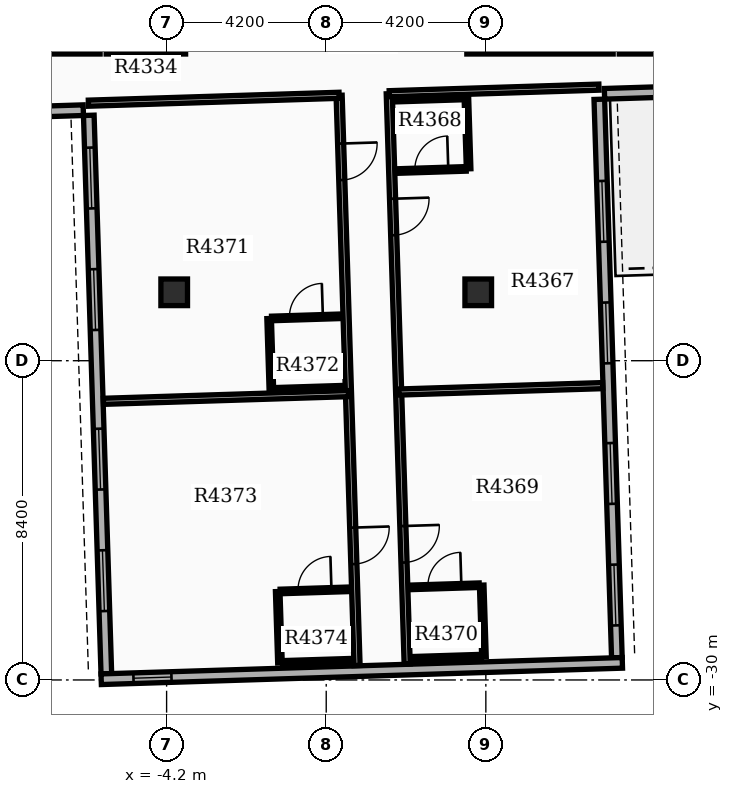
"""IFC4 building model, lengths in metres.
Left out: names, types, materials, properties, quantities, classifications, styles, units other than length and angle.
Written with IfcOpenShell. Run it as: python <this file> out.ifc"""

import sys

from ifc_helpers import new_model, si_unit, direction, frame, frame_2d, origin, origin_2d, place, context, subcontext, project, spatial, rectangle, extrude, element, fill, save


model = new_model("IFC4")
c1 = context("Model", 3, precision=1e-05, world=origin(), true_north=direction((0.0, 1.0)))
c2 = subcontext(c1, "Body", "Model", "MODEL_VIEW")
j1 = project(units=[si_unit("LENGTHUNIT", "METRE"), si_unit("PLANEANGLEUNIT", "RADIAN")], contexts=[c1])
p1 = place(None, origin())
s1 = spatial("IfcSite", under=j1, at=p1, CompositionType="ELEMENT")
p2 = place(p1, origin())
s2 = spatial("IfcBuilding", under=s1, at=p2, CompositionType="ELEMENT")
p3 = place(p2, frame((0.0, 0.0, 273.3)))
s3 = spatial("IfcBuildingStorey", under=s2, at=p3, CompositionType="ELEMENT", Elevation=273.3)
for number, where, z_axis, x_axis in (
    (1, (-4.0, -19.8, 0.0), (0.0, 0.0, 1.0), (1.0, 0.0, 0.0)),
    (2, (4.0, -19.8, 0.0), (0.0, 0.0, 1.0), (1.0, 0.0, 0.0)),
):
    element("IfcColumn", number, at=place(p3, frame(where, z_axis=z_axis, x_axis=x_axis)), inside=s3, PredefinedType="COLUMN", context=c2, shape_type="SweptSolid", body=[
        extrude(rectangle(XDim=0.7, YDim=0.7, at=origin_2d()), origin(), (0.0, 0.0, 1.0), 3.9),
    ])
p4 = place(p3, frame((-6.247, -15.144, 0.0), z_axis=(0.0, 0.0, 1.0), x_axis=(0.031406376864, -0.999506698073, 0.0)))
e3 = element("IfcWall", 3, at=p4, inside=s3, PredefinedType="STANDARD", context=c2, shape_type="SweptSolid", body=[
    extrude(rectangle(XDim=14.7, YDim=0.28, at=frame_2d((7.35, 0.0))), origin(), (0.0, 0.0, 1.0), 3.18),
])
p5 = place(p4, frame((0.85, 0.0, 0.8)))
e4 = element("IfcOpeningElement", 4, at=p5, cuts=e3, PredefinedType="OPENING", context=c2, shape_type="SweptSolid", body=[
    extrude(rectangle(XDim=1.6, YDim=1.7, at=frame_2d((0.8, 0.85))), frame((0.0, 0.15, 0.0), z_axis=(0.0, -1.0, 0.0), x_axis=(1.0, 0.0, 0.0)), (0.0, 0.0, 1.0), 0.3),
])
p6 = place(p4, frame((4.05, 0.0, 0.8)))
e5 = element("IfcOpeningElement", 5, at=p6, cuts=e3, PredefinedType="OPENING", context=c2, shape_type="SweptSolid", body=[
    extrude(rectangle(XDim=1.6, YDim=1.7, at=frame_2d((0.8, 0.85))), frame((0.0, 0.15, 0.0), z_axis=(0.0, -1.0, 0.0), x_axis=(1.0, 0.0, 0.0)), (0.0, 0.0, 1.0), 0.3),
])
p7 = place(p4, frame((8.25, 0.0, 0.8)))
e6 = element("IfcOpeningElement", 6, at=p7, cuts=e3, PredefinedType="OPENING", context=c2, shape_type="SweptSolid", body=[
    extrude(rectangle(XDim=1.6, YDim=1.7, at=frame_2d((0.8, 0.85))), frame((0.0, 0.15, 0.0), z_axis=(0.0, -1.0, 0.0), x_axis=(1.0, 0.0, 0.0)), (0.0, 0.0, 1.0), 0.3),
])
p8 = place(p4, frame((11.45, 0.0, 0.8)))
e7 = element("IfcOpeningElement", 7, at=p8, cuts=e3, PredefinedType="OPENING", context=c2, shape_type="SweptSolid", body=[
    extrude(rectangle(XDim=1.6, YDim=1.7, at=frame_2d((0.8, 0.85))), frame((0.0, 0.15, 0.0), z_axis=(0.0, -1.0, 0.0), x_axis=(1.0, 0.0, 0.0)), (0.0, 0.0, 1.0), 0.3),
])
p9 = place(p3, frame((7.648, -29.414, 0.0), z_axis=(0.0, 0.0, 1.0), x_axis=(-0.031405855522, 0.999506714454, 0.0)))
e8 = element("IfcWall", 8, at=p9, inside=s3, PredefinedType="STANDARD", context=c2, shape_type="SweptSolid", body=[
    extrude(rectangle(XDim=14.7, YDim=0.28, at=frame_2d((7.35, 0.0))), origin(), (0.0, 0.0, 1.0), 3.18),
])
p10 = place(p9, frame((0.85, 0.0, 0.8)))
e9 = element("IfcOpeningElement", 9, at=p10, cuts=e8, PredefinedType="OPENING", context=c2, shape_type="SweptSolid", body=[
    extrude(rectangle(XDim=1.6, YDim=1.7, at=frame_2d((0.8, 0.85))), frame((0.0, 0.15, 0.0), z_axis=(0.0, -1.0, 0.0), x_axis=(1.0, 0.0, 0.0)), (0.0, 0.0, 1.0), 0.3),
])
p11 = place(p9, frame((4.05, 0.0, 0.8)))
e10 = element("IfcOpeningElement", 10, at=p11, cuts=e8, PredefinedType="OPENING", context=c2, shape_type="SweptSolid", body=[
    extrude(rectangle(XDim=1.6, YDim=1.7, at=frame_2d((0.8, 0.85))), frame((0.0, 0.15, 0.0), z_axis=(0.0, -1.0, 0.0), x_axis=(1.0, 0.0, 0.0)), (0.0, 0.0, 1.0), 0.3),
])
p12 = place(p9, frame((7.75, 0.0, 0.8)))
e11 = element("IfcOpeningElement", 11, at=p12, cuts=e8, PredefinedType="OPENING", context=c2, shape_type="SweptSolid", body=[
    extrude(rectangle(XDim=1.6, YDim=1.7, at=frame_2d((0.8, 0.85))), frame((0.0, 0.15, 0.0), z_axis=(0.0, -1.0, 0.0), x_axis=(1.0, 0.0, 0.0)), (0.0, 0.0, 1.0), 0.3),
])
p13 = place(p9, frame((10.95, 0.0, 0.8)))
e12 = element("IfcOpeningElement", 12, at=p13, cuts=e8, PredefinedType="OPENING", context=c2, shape_type="SweptSolid", body=[
    extrude(rectangle(XDim=1.6, YDim=1.7, at=frame_2d((0.8, 0.85))), frame((0.0, 0.15, 0.0), z_axis=(0.0, -1.0, 0.0), x_axis=(1.0, 0.0, 0.0)), (0.0, 0.0, 1.0), 0.3),
])
p14 = place(p3, frame((-5.921, -29.981, 0.0), z_axis=(0.0, 0.0, 1.0), x_axis=(0.999506662003, 0.031407524763, 0.0)))
e13 = element("IfcWall", 13, at=p14, inside=s3, PredefinedType="STANDARD", context=c2, shape_type="SweptSolid", body=[
    extrude(rectangle(XDim=13.72, YDim=0.28, at=frame_2d((6.86, 0.0))), origin(), (0.0, 0.0, 1.0), 3.18),
])
p15 = place(p14, frame((0.85, 0.0, 0.85)))
e14 = element("IfcOpeningElement", 14, at=p15, cuts=e13, PredefinedType="OPENING", context=c2, shape_type="SweptSolid", body=[
    extrude(rectangle(XDim=1.0, YDim=1.5, at=frame_2d((0.5, 0.75))), frame((0.0, 0.15, 0.0), z_axis=(0.0, -1.0, 0.0), x_axis=(1.0, 0.0, 0.0)), (0.0, 0.0, 1.0), 0.3),
])
p16 = place(p3, frame((-12.689, -15.206, 0.0), z_axis=(0.0, 0.0, 1.0), x_axis=(0.999507262922, 0.031388395416, 0.0)))
e15 = element("IfcWall", 15, at=p16, inside=s3, PredefinedType="STANDARD", context=c2, shape_type="SweptSolid", body=[
    extrude(rectangle(XDim=6.3, YDim=0.28, at=frame_2d((3.15, 0.0))), origin(), (0.0, 0.0, 1.0), 3.18),
])
p17 = place(p3, frame((13.618, -14.379, 0.0), z_axis=(0.0, 0.0, 1.0), x_axis=(-0.999507224741, -0.031389611199, 0.0)))
e16 = element("IfcWall", 16, at=p17, inside=s3, PredefinedType="STANDARD", context=c2, shape_type="SweptSolid", body=[
    extrude(rectangle(XDim=6.3, YDim=0.28, at=frame_2d((3.15, 0.0))), origin(), (0.0, 0.0, 1.0), 3.18),
])
p18 = place(p3, frame((3.7, -13.45, 0.0), z_axis=(0.0, 0.0, 1.0), x_axis=(1.0, 0.0, 0.0)))
e17 = element("IfcWall", 17, at=p18, inside=s3, PredefinedType="PARTITIONING", context=c2, shape_type="SweptSolid", body=[
    extrude(rectangle(XDim=3.85, YDim=0.16, at=frame_2d((1.925, 0.0))), origin(), (0.0, 0.0, 1.0), 3.17),
])
p19 = place(p3, frame((7.71, -13.45, 0.0), z_axis=(0.0, 0.0, 1.0), x_axis=(1.0, 0.0, 0.0)))
e18 = element("IfcWall", 18, at=p19, inside=s3, PredefinedType="PARTITIONING", context=c2, shape_type="SweptSolid", body=[
    extrude(rectangle(XDim=3.29, YDim=0.16, at=frame_2d((1.645, 0.0))), origin(), (0.0, 0.0, 1.0), 3.17),
])
p20 = place(p3, frame((-7.89, -13.45, 0.0), z_axis=(0.0, 0.0, 1.0), x_axis=(1.0, 0.0, 0.0)))
e19 = element("IfcWall", 19, at=p20, inside=s3, PredefinedType="PARTITIONING", context=c2, shape_type="SweptSolid", body=[
    extrude(rectangle(XDim=1.94, YDim=0.16, at=frame_2d((0.97, 0.0))), origin(), (0.0, 0.0, 1.0), 3.17),
])
p21 = place(p3, frame((-5.79, -13.45, 0.0), z_axis=(0.0, 0.0, 1.0), x_axis=(1.0, 0.0, 0.0)))
e20 = element("IfcWall", 20, at=p21, inside=s3, PredefinedType="PARTITIONING", context=c2, shape_type="SweptSolid", body=[
    extrude(rectangle(XDim=2.09, YDim=0.16, at=frame_2d((1.045, 0.0))), origin(), (0.0, 0.0, 1.0), 3.17),
])
p22 = place(p3, frame((1.659, -14.575, 0.0), z_axis=(0.0, 0.0, 1.0), x_axis=(0.031404333983, -0.999506762262, 0.0)))
e21 = element("IfcWall", 21, at=p22, inside=s3, PredefinedType="PARTITIONING", context=c2, shape_type="SweptSolid", body=[
    extrude(rectangle(XDim=15.012, YDim=0.16, at=frame_2d((7.506, 0.0))), origin(), (0.0, 0.0, 1.0), 3.17),
])
p23 = place(p22, frame((2.765, 0.0, 0.0)))
e22 = element("IfcOpeningElement", 22, at=p23, cuts=e21, PredefinedType="OPENING", context=c2, shape_type="SweptSolid", body=[
    extrude(rectangle(XDim=0.96, YDim=2.15, at=frame_2d((0.48, 1.075))), frame((0.0, 0.09, 0.0), z_axis=(0.0, -1.0, 0.0), x_axis=(1.0, 0.0, 0.0)), (0.0, 0.0, 1.0), 0.18),
])
p24 = place(p22, frame((11.381, 0.0, 0.0)))
e23 = element("IfcOpeningElement", 23, at=p24, cuts=e21, PredefinedType="OPENING", context=c2, shape_type="SweptSolid", body=[
    extrude(rectangle(XDim=0.96, YDim=2.15, at=frame_2d((0.48, 1.075))), frame((0.0, 0.09, 0.0), z_axis=(0.0, -1.0, 0.0), x_axis=(1.0, 0.0, 0.0)), (0.0, 0.0, 1.0), 0.18),
])
p25 = place(p3, frame((1.659, -14.575, 0.0), z_axis=(0.0, 0.0, 1.0), x_axis=(0.999505408206, 0.031447400002, 0.0)))
e24 = element("IfcWall", 24, at=p25, inside=s3, PredefinedType="PARTITIONING", context=c2, shape_type="SweptSolid", body=[
    extrude(rectangle(XDim=5.52, YDim=0.16, at=frame_2d((2.76, 0.0))), origin(), (0.0, 0.0, 1.0), 3.17),
])
p26 = place(p3, frame((1.905, -22.424, 0.0), z_axis=(0.0, 0.0, 1.0), x_axis=(0.999505358078, 0.031448993216, 0.0)))
e25 = element("IfcWall", 25, at=p26, inside=s3, PredefinedType="PARTITIONING", context=c2, shape_type="SweptSolid", body=[
    extrude(rectangle(XDim=5.372, YDim=0.16, at=frame_2d((2.686, 0.0))), origin(), (0.0, 0.0, 1.0), 3.17),
])
p27 = place(p3, frame((1.863, -16.61, 0.0), z_axis=(0.0, 0.0, 1.0), x_axis=(0.999507221803, 0.031389704724, 0.0)))
e26 = element("IfcWall", 26, at=p27, inside=s3, PredefinedType="PARTITIONING", context=c2, shape_type="SweptSolid", body=[
    extrude(rectangle(XDim=1.82, YDim=0.12, at=frame_2d((0.91, 0.0))), origin(), (0.0, 0.0, 1.0), 3.17),
])
p28 = place(p27, frame((0.47, 0.0, 0.0)))
e27 = element("IfcOpeningElement", 27, at=p28, cuts=e26, PredefinedType="OPENING", context=c2, shape_type="SweptSolid", body=[
    extrude(rectangle(XDim=0.88, YDim=2.1, at=frame_2d((0.44, 1.05))), frame((0.0, 0.07, 0.0), z_axis=(0.0, -1.0, 0.0), x_axis=(1.0, 0.0, 0.0)), (0.0, 0.0, 1.0), 0.14),
])
p29 = place(p3, frame((1.804, -14.731, 0.0), z_axis=(0.0, 0.0, 1.0), x_axis=(0.999503004171, 0.03152371574, 0.0)))
e28 = element("IfcWall", 28, at=p29, inside=s3, PredefinedType="PARTITIONING", context=c2, shape_type="SweptSolid", body=[
    extrude(rectangle(XDim=1.82, YDim=0.12, at=frame_2d((0.91, 0.0))), origin(), (0.0, 0.0, 1.0), 3.17),
])
p30 = place(p3, frame((3.688, -14.671, 0.0), z_axis=(0.0, 0.0, 1.0), x_axis=(0.031295563454, -0.999510173889, 0.0)))
e29 = element("IfcWall", 29, at=p30, inside=s3, PredefinedType="PARTITIONING", context=c2, shape_type="SweptSolid", body=[
    extrude(rectangle(XDim=1.88, YDim=0.12, at=frame_2d((0.94, 0.0))), origin(), (0.0, 0.0, 1.0), 3.17),
])
p31 = place(p3, frame((2.207, -27.564, 0.0), z_axis=(0.0, 0.0, 1.0), x_axis=(0.999507221803, 0.031389704724, 0.0)))
e30 = element("IfcWall", 30, at=p31, inside=s3, PredefinedType="PARTITIONING", context=c2, shape_type="SweptSolid", body=[
    extrude(rectangle(XDim=1.82, YDim=0.12, at=frame_2d((0.91, 0.0))), origin(), (0.0, 0.0, 1.0), 3.17),
])
p32 = place(p31, frame((0.47, 0.0, 0.0)))
e31 = element("IfcOpeningElement", 31, at=p32, cuts=e30, PredefinedType="OPENING", context=c2, shape_type="SweptSolid", body=[
    extrude(rectangle(XDim=0.88, YDim=2.1, at=frame_2d((0.44, 1.05))), frame((0.0, 0.07, 0.0), z_axis=(0.0, -1.0, 0.0), x_axis=(1.0, 0.0, 0.0)), (0.0, 0.0, 1.0), 0.14),
])
p33 = place(p3, frame((2.266, -29.443, 0.0), z_axis=(0.0, 0.0, 1.0), x_axis=(0.999507221803, 0.031389704724, 0.0)))
e32 = element("IfcWall", 32, at=p33, inside=s3, PredefinedType="PARTITIONING", context=c2, shape_type="SweptSolid", body=[
    extrude(rectangle(XDim=1.82, YDim=0.12, at=frame_2d((0.91, 0.0))), origin(), (0.0, 0.0, 1.0), 3.17),
])
p34 = place(p3, frame((4.091, -27.505, 0.0), z_axis=(0.0, 0.0, 1.0), x_axis=(0.031299625942, -0.999510046681, 0.0)))
e33 = element("IfcWall", 33, at=p34, inside=s3, PredefinedType="PARTITIONING", context=c2, shape_type="SweptSolid", body=[
    extrude(rectangle(XDim=1.88, YDim=0.12, at=frame_2d((0.94, 0.0))), origin(), (0.0, 0.0, 1.0), 3.17),
])
p35 = place(p3, frame((0.339, -14.617, 0.0), z_axis=(0.0, 0.0, 1.0), x_axis=(0.031404333983, -0.999506762262, 0.0)))
e34 = element("IfcWall", 34, at=p35, inside=s3, PredefinedType="PARTITIONING", context=c2, shape_type="SweptSolid", body=[
    extrude(rectangle(XDim=15.012, YDim=0.16, at=frame_2d((7.506, 0.0))), origin(), (0.0, 0.0, 1.0), 3.17),
])
p36 = place(p35, frame((1.271, 0.0, 0.0)))
e35 = element("IfcOpeningElement", 35, at=p36, cuts=e34, PredefinedType="OPENING", context=c2, shape_type="SweptSolid", body=[
    extrude(rectangle(XDim=0.96, YDim=2.15, at=frame_2d((0.48, 1.075))), frame((0.0, 0.09, 0.0), z_axis=(0.0, -1.0, 0.0), x_axis=(1.0, 0.0, 0.0)), (0.0, 0.0, 1.0), 0.18),
])
p37 = place(p35, frame((11.381, 0.0, 0.0)))
e36 = element("IfcOpeningElement", 36, at=p37, cuts=e34, PredefinedType="OPENING", context=c2, shape_type="SweptSolid", body=[
    extrude(rectangle(XDim=0.96, YDim=2.15, at=frame_2d((0.48, 1.075))), frame((0.0, 0.09, 0.0), z_axis=(0.0, -1.0, 0.0), x_axis=(1.0, 0.0, 0.0)), (0.0, 0.0, 1.0), 0.18),
])
p38 = place(p3, frame((0.339, -14.617, 0.0), z_axis=(0.0, 0.0, 1.0), x_axis=(-0.999506756764, -0.031404508956, 0.0)))
e37 = element("IfcWall", 37, at=p38, inside=s3, PredefinedType="PARTITIONING", context=c2, shape_type="SweptSolid", body=[
    extrude(rectangle(XDim=6.6, YDim=0.16, at=frame_2d((3.3, 0.0))), origin(), (0.0, 0.0, 1.0), 3.17),
])
p39 = place(p3, frame((0.586, -22.466, 0.0), z_axis=(0.0, 0.0, 1.0), x_axis=(-0.999506671308, -0.031407228636, 0.0)))
e38 = element("IfcWall", 38, at=p39, inside=s3, PredefinedType="PARTITIONING", context=c2, shape_type="SweptSolid", body=[
    extrude(rectangle(XDim=6.452, YDim=0.16, at=frame_2d((3.226, 0.0))), origin(), (0.0, 0.0, 1.0), 3.17),
])
p40 = place(p3, frame((-1.437, -20.488, 0.0), z_axis=(0.0, 0.0, 1.0), x_axis=(0.999507221803, 0.031389704724, 0.0)))
e39 = element("IfcWall", 39, at=p40, inside=s3, PredefinedType="PARTITIONING", context=c2, shape_type="SweptSolid", body=[
    extrude(rectangle(XDim=1.82, YDim=0.12, at=frame_2d((0.91, 0.0))), origin(), (0.0, 0.0, 1.0), 3.17),
])
p41 = place(p40, frame((0.47, 0.0, 0.0)))
e40 = element("IfcOpeningElement", 40, at=p41, cuts=e39, PredefinedType="OPENING", context=c2, shape_type="SweptSolid", body=[
    extrude(rectangle(XDim=0.88, YDim=2.1, at=frame_2d((0.44, 1.05))), frame((0.0, 0.07, 0.0), z_axis=(0.0, -1.0, 0.0), x_axis=(1.0, 0.0, 0.0)), (0.0, 0.0, 1.0), 0.14),
])
p42 = place(p3, frame((-1.378, -22.367, 0.0), z_axis=(0.0, 0.0, 1.0), x_axis=(0.999511421504, 0.031255692016, 0.0)))
e41 = element("IfcWall", 41, at=p42, inside=s3, PredefinedType="PARTITIONING", context=c2, shape_type="SweptSolid", body=[
    extrude(rectangle(XDim=1.82, YDim=0.12, at=frame_2d((0.91, 0.0))), origin(), (0.0, 0.0, 1.0), 3.17),
])
p43 = place(p3, frame((-1.502, -20.49, 0.0), z_axis=(0.0, 0.0, 1.0), x_axis=(0.031425292588, -0.999506103526, 0.0)))
e42 = element("IfcWall", 42, at=p43, inside=s3, PredefinedType="PARTITIONING", context=c2, shape_type="SweptSolid", body=[
    extrude(rectangle(XDim=1.88, YDim=0.12, at=frame_2d((0.94, 0.0))), origin(), (0.0, 0.0, 1.0), 3.17),
])
p44 = place(p3, frame((-1.211, -27.672, 0.0), z_axis=(0.0, 0.0, 1.0), x_axis=(0.999507221803, 0.031389704724, 0.0)))
e43 = element("IfcWall", 43, at=p44, inside=s3, PredefinedType="PARTITIONING", context=c2, shape_type="SweptSolid", body=[
    extrude(rectangle(XDim=1.82, YDim=0.12, at=frame_2d((0.91, 0.0))), origin(), (0.0, 0.0, 1.0), 3.17),
])
p45 = place(p44, frame((0.47, 0.0, 0.0)))
e44 = element("IfcOpeningElement", 44, at=p45, cuts=e43, PredefinedType="OPENING", context=c2, shape_type="SweptSolid", body=[
    extrude(rectangle(XDim=0.88, YDim=2.1, at=frame_2d((0.44, 1.05))), frame((0.0, 0.07, 0.0), z_axis=(0.0, -1.0, 0.0), x_axis=(1.0, 0.0, 0.0)), (0.0, 0.0, 1.0), 0.14),
])
p46 = place(p3, frame((-1.152, -29.551, 0.0), z_axis=(0.0, 0.0, 1.0), x_axis=(0.999507221803, 0.031389704724, 0.0)))
e45 = element("IfcWall", 45, at=p46, inside=s3, PredefinedType="PARTITIONING", context=c2, shape_type="SweptSolid", body=[
    extrude(rectangle(XDim=1.82, YDim=0.12, at=frame_2d((0.91, 0.0))), origin(), (0.0, 0.0, 1.0), 3.17),
])
p47 = place(p3, frame((-1.276, -27.674, 0.0), z_axis=(0.0, 0.0, 1.0), x_axis=(0.031425292588, -0.999506103526, 0.0)))
e46 = element("IfcWall", 46, at=p47, inside=s3, PredefinedType="PARTITIONING", context=c2, shape_type="SweptSolid", body=[
    extrude(rectangle(XDim=1.88, YDim=0.12, at=frame_2d((0.94, 0.0))), origin(), (0.0, 0.0, 1.0), 3.17),
])
p48 = place(p5, origin())
e47 = element("IfcWindow", 47, at=p48, inside=s3, PartitioningType="SINGLE_PANEL", PredefinedType="WINDOW", context=c2, shape_type="SweptSolid", body=[
    extrude(rectangle(XDim=1.6, YDim=1.7, at=frame_2d((0.8, 0.85))), frame((0.0, 0.03, 0.0), z_axis=(0.0, -1.0, 0.0), x_axis=(1.0, 0.0, 0.0)), (0.0, 0.0, 1.0), 0.06),
])
fill(e4, e47)
p49 = place(p6, origin())
e48 = element("IfcWindow", 48, at=p49, inside=s3, PartitioningType="SINGLE_PANEL", PredefinedType="WINDOW", context=c2, shape_type="SweptSolid", body=[
    extrude(rectangle(XDim=1.6, YDim=1.7, at=frame_2d((0.8, 0.85))), frame((0.0, 0.03, 0.0), z_axis=(0.0, -1.0, 0.0), x_axis=(1.0, 0.0, 0.0)), (0.0, 0.0, 1.0), 0.06),
])
fill(e5, e48)
p50 = place(p7, origin())
e49 = element("IfcWindow", 49, at=p50, inside=s3, PartitioningType="SINGLE_PANEL", PredefinedType="WINDOW", context=c2, shape_type="SweptSolid", body=[
    extrude(rectangle(XDim=1.6, YDim=1.7, at=frame_2d((0.8, 0.85))), frame((0.0, 0.03, 0.0), z_axis=(0.0, -1.0, 0.0), x_axis=(1.0, 0.0, 0.0)), (0.0, 0.0, 1.0), 0.06),
])
fill(e6, e49)
p51 = place(p8, origin())
e50 = element("IfcWindow", 50, at=p51, inside=s3, PartitioningType="SINGLE_PANEL", PredefinedType="WINDOW", context=c2, shape_type="SweptSolid", body=[
    extrude(rectangle(XDim=1.6, YDim=1.7, at=frame_2d((0.8, 0.85))), frame((0.0, 0.03, 0.0), z_axis=(0.0, -1.0, 0.0), x_axis=(1.0, 0.0, 0.0)), (0.0, 0.0, 1.0), 0.06),
])
fill(e7, e50)
p52 = place(p10, origin())
e51 = element("IfcWindow", 51, at=p52, inside=s3, PartitioningType="SINGLE_PANEL", PredefinedType="WINDOW", context=c2, shape_type="SweptSolid", body=[
    extrude(rectangle(XDim=1.6, YDim=1.7, at=frame_2d((0.8, 0.85))), frame((0.0, 0.03, 0.0), z_axis=(0.0, -1.0, 0.0), x_axis=(1.0, 0.0, 0.0)), (0.0, 0.0, 1.0), 0.06),
])
fill(e9, e51)
p53 = place(p11, origin())
e52 = element("IfcWindow", 52, at=p53, inside=s3, PartitioningType="SINGLE_PANEL", PredefinedType="WINDOW", context=c2, shape_type="SweptSolid", body=[
    extrude(rectangle(XDim=1.6, YDim=1.7, at=frame_2d((0.8, 0.85))), frame((0.0, 0.03, 0.0), z_axis=(0.0, -1.0, 0.0), x_axis=(1.0, 0.0, 0.0)), (0.0, 0.0, 1.0), 0.06),
])
fill(e10, e52)
p54 = place(p12, origin())
e53 = element("IfcWindow", 53, at=p54, inside=s3, PartitioningType="SINGLE_PANEL", PredefinedType="WINDOW", context=c2, shape_type="SweptSolid", body=[
    extrude(rectangle(XDim=1.6, YDim=1.7, at=frame_2d((0.8, 0.85))), frame((0.0, 0.03, 0.0), z_axis=(0.0, -1.0, 0.0), x_axis=(1.0, 0.0, 0.0)), (0.0, 0.0, 1.0), 0.06),
])
fill(e11, e53)
p55 = place(p13, origin())
e54 = element("IfcWindow", 54, at=p55, inside=s3, PartitioningType="SINGLE_PANEL", PredefinedType="WINDOW", context=c2, shape_type="SweptSolid", body=[
    extrude(rectangle(XDim=1.6, YDim=1.7, at=frame_2d((0.8, 0.85))), frame((0.0, 0.03, 0.0), z_axis=(0.0, -1.0, 0.0), x_axis=(1.0, 0.0, 0.0)), (0.0, 0.0, 1.0), 0.06),
])
fill(e12, e54)
p56 = place(p15, origin())
e55 = element("IfcWindow", 55, at=p56, inside=s3, PartitioningType="SINGLE_PANEL", PredefinedType="WINDOW", context=c2, shape_type="SweptSolid", body=[
    extrude(rectangle(XDim=1.0, YDim=1.5, at=frame_2d((0.5, 0.75))), frame((0.0, 0.03, 0.0), z_axis=(0.0, -1.0, 0.0), x_axis=(1.0, 0.0, 0.0)), (0.0, 0.0, 1.0), 0.06),
])
fill(e14, e55)
p57 = place(p23, origin())
e56 = element("IfcDoor", 56, at=p57, inside=s3, OperationType="SINGLE_SWING_LEFT", PredefinedType="DOOR", context=c2, shape_type="SweptSolid", body=[
    extrude(rectangle(XDim=0.96, YDim=2.15, at=frame_2d((0.48, 1.075))), frame((0.0, 0.025, 0.0), z_axis=(0.0, -1.0, 0.0), x_axis=(1.0, 0.0, 0.0)), (0.0, 0.0, 1.0), 0.05),
])
fill(e22, e56)
p58 = place(p28, origin())
e57 = element("IfcDoor", 57, at=p58, inside=s3, OperationType="SINGLE_SWING_RIGHT", PredefinedType="DOOR", context=c2, shape_type="SweptSolid", body=[
    extrude(rectangle(XDim=0.88, YDim=2.1, at=frame_2d((0.44, 1.05))), frame((0.0, 0.025, 0.0), z_axis=(0.0, -1.0, 0.0), x_axis=(1.0, 0.0, 0.0)), (0.0, 0.0, 1.0), 0.05),
])
fill(e27, e57)
p59 = place(p24, origin())
e58 = element("IfcDoor", 58, at=p59, inside=s3, OperationType="SINGLE_SWING_LEFT", PredefinedType="DOOR", context=c2, shape_type="SweptSolid", body=[
    extrude(rectangle(XDim=0.96, YDim=2.15, at=frame_2d((0.48, 1.075))), frame((0.0, 0.025, 0.0), z_axis=(0.0, -1.0, 0.0), x_axis=(1.0, 0.0, 0.0)), (0.0, 0.0, 1.0), 0.05),
])
fill(e23, e58)
p60 = place(p32, origin())
e59 = element("IfcDoor", 59, at=p60, inside=s3, OperationType="SINGLE_SWING_RIGHT", PredefinedType="DOOR", context=c2, shape_type="SweptSolid", body=[
    extrude(rectangle(XDim=0.88, YDim=2.1, at=frame_2d((0.44, 1.05))), frame((0.0, 0.025, 0.0), z_axis=(0.0, -1.0, 0.0), x_axis=(1.0, 0.0, 0.0)), (0.0, 0.0, 1.0), 0.05),
])
fill(e31, e59)
p61 = place(p36, origin())
e60 = element("IfcDoor", 60, at=p61, inside=s3, OperationType="SINGLE_SWING_LEFT", PredefinedType="DOOR", context=c2, shape_type="SweptSolid", body=[
    extrude(rectangle(XDim=0.96, YDim=2.15, at=frame_2d((0.48, 1.075))), frame((0.0, 0.025, 0.0), z_axis=(0.0, -1.0, 0.0), x_axis=(1.0, 0.0, 0.0)), (0.0, 0.0, 1.0), 0.05),
])
fill(e35, e60)
p62 = place(p41, origin())
e61 = element("IfcDoor", 61, at=p62, inside=s3, OperationType="SINGLE_SWING_RIGHT", PredefinedType="DOOR", context=c2, shape_type="SweptSolid", body=[
    extrude(rectangle(XDim=0.88, YDim=2.1, at=frame_2d((0.44, 1.05))), frame((0.0, 0.025, 0.0), z_axis=(0.0, -1.0, 0.0), x_axis=(1.0, 0.0, 0.0)), (0.0, 0.0, 1.0), 0.05),
])
fill(e40, e61)
p63 = place(p37, origin())
e62 = element("IfcDoor", 62, at=p63, inside=s3, OperationType="SINGLE_SWING_LEFT", PredefinedType="DOOR", context=c2, shape_type="SweptSolid", body=[
    extrude(rectangle(XDim=0.96, YDim=2.15, at=frame_2d((0.48, 1.075))), frame((0.0, 0.025, 0.0), z_axis=(0.0, -1.0, 0.0), x_axis=(1.0, 0.0, 0.0)), (0.0, 0.0, 1.0), 0.05),
])
fill(e36, e62)
p64 = place(p45, origin())
e63 = element("IfcDoor", 63, at=p64, inside=s3, OperationType="SINGLE_SWING_RIGHT", PredefinedType="DOOR", context=c2, shape_type="SweptSolid", body=[
    extrude(rectangle(XDim=0.88, YDim=2.1, at=frame_2d((0.44, 1.05))), frame((0.0, 0.025, 0.0), z_axis=(0.0, -1.0, 0.0), x_axis=(1.0, 0.0, 0.0)), (0.0, 0.0, 1.0), 0.05),
])
fill(e44, e63)
save(model, sys.argv[1])
